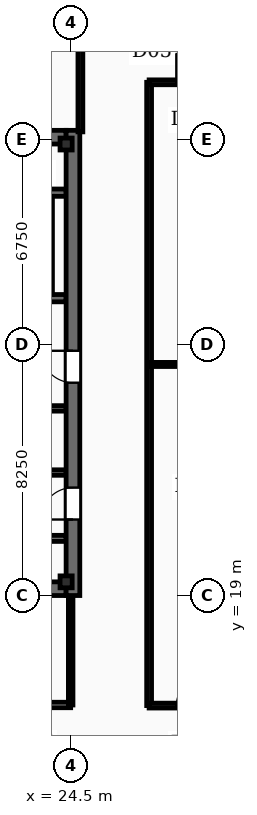
"""IFC4 building model, lengths in metres.
Left out: names, types, materials, properties, quantities, classifications, styles, units other than length and angle.
Written with IfcOpenShell. Run it as: python <this file> out.ifc"""

import sys

from ifc_helpers import new_model, si_unit, direction, frame, frame_2d, origin, origin_2d, place, context, subcontext, project, spatial, rectangle, i_section, extrude, element, fill, save


model = new_model("IFC4")
c1 = context("Model", 3, precision=1e-05, world=origin(), true_north=direction((0.0, 1.0)))
c2 = subcontext(c1, "Body", "Model", "MODEL_VIEW")
j1 = project(units=[si_unit("LENGTHUNIT", "METRE"), si_unit("PLANEANGLEUNIT", "RADIAN")], contexts=[c1])
p1 = place(None, origin())
s1 = spatial("IfcSite", under=j1, at=p1, CompositionType="ELEMENT")
p2 = place(p1, origin())
s2 = spatial("IfcBuilding", under=s1, at=p2, CompositionType="ELEMENT")
p3 = place(p2, frame((0.0, 0.0, 232.2)))
s3 = spatial("IfcBuildingStorey", under=s2, at=p3, CompositionType="ELEMENT", Elevation=232.2)
p4 = place(p3, frame((24.575, 19.0, -0.27), z_axis=(0.0, 0.0, 1.0), x_axis=(0.0, 1.0, 0.0)))
e1 = element("IfcWall", 1, at=p4, inside=s3, PredefinedType="SHEAR", context=c2, shape_type="SweptSolid", body=[
    extrude(rectangle(XDim=15.3, YDim=0.45, at=frame_2d((7.65, 0.0))), origin(), (0.0, 0.0, 1.0), 3.75),
])
p5 = place(p4, frame((2.5, 0.0, 0.27)))
e2 = element("IfcOpeningElement", 2, at=p5, cuts=e1, PredefinedType="OPENING", context=c2, shape_type="SweptSolid", body=[
    extrude(rectangle(XDim=1.05, YDim=2.15, at=frame_2d((0.525, 1.075))), frame((0.0, 0.235, 0.0), z_axis=(0.0, -1.0, 0.0), x_axis=(1.0, 0.0, 0.0)), (0.0, 0.0, 1.0), 0.47),
])
p6 = place(p4, frame((7.0, 0.0, 0.27)))
e3 = element("IfcOpeningElement", 3, at=p6, cuts=e1, PredefinedType="OPENING", context=c2, shape_type="SweptSolid", body=[
    extrude(rectangle(XDim=1.05, YDim=2.15, at=frame_2d((0.525, 1.075))), frame((0.0, 0.235, 0.0), z_axis=(0.0, -1.0, 0.0), x_axis=(1.0, 0.0, 0.0)), (0.0, 0.0, 1.0), 0.47),
])
for number, where, z_axis, x_axis in (
    (4, (14.55, 19.225, -0.27), (0.0, 0.0, 1.0), (1.0, 0.0, 0.0)),
    (5, (14.55, 34.075, -0.27), (0.0, 0.0, 1.0), (1.0, 0.0, 0.0)),
):
    element("IfcWall", number, at=place(p3, frame(where, z_axis=z_axis, x_axis=x_axis)), inside=s3, PredefinedType="SHEAR", context=c2, shape_type="SweptSolid", body=[
        extrude(rectangle(XDim=9.8, YDim=0.45, at=frame_2d((4.9, 0.0))), origin(), (0.0, 0.0, 1.0), 3.75),
    ])
for number, where, z_axis, x_axis in (
    (6, (24.35, 19.45, -0.27), (0.0, 0.0, 1.0), (1.0, 0.0, 0.0)),
    (7, (24.35, 33.85, -0.27), (0.0, 0.0, 1.0), (1.0, 0.0, 0.0)),
):
    element("IfcColumn", number, at=place(p3, frame(where, z_axis=z_axis, x_axis=x_axis)), inside=s3, PredefinedType="COLUMN", context=c2, shape_type="SweptSolid", body=[
        extrude(i_section(OverallWidth=0.399, OverallDepth=0.393, WebThickness=0.023, FlangeThickness=0.037, FilletRadius=0.02, at=origin_2d()), origin(), (0.0, 0.0, 1.0), 3.75),
    ])
p7 = place(p3, frame((24.35, 28.78, 0.0), z_axis=(0.0, 0.0, 1.0), x_axis=(-1.0, 0.0, 0.0)))
e8 = element("IfcWall", 8, at=p7, inside=s3, PredefinedType="SOLIDWALL", context=c2, shape_type="SweptSolid", body=[
    extrude(rectangle(XDim=9.8, YDim=0.24, at=frame_2d((4.9, 0.0))), origin(), (0.0, 0.0, 1.0), 3.48),
])
p8 = place(p7, frame((7.83, 0.0, 0.0)))
e9 = element("IfcOpeningElement", 9, at=p8, cuts=e8, PredefinedType="OPENING", context=c2, shape_type="SweptSolid", body=[
    extrude(rectangle(XDim=1.1, YDim=2.15, at=frame_2d((0.55, 1.075))), frame((0.0, 0.13, 0.0), z_axis=(0.0, -1.0, 0.0), x_axis=(1.0, 0.0, 0.0)), (0.0, 0.0, 1.0), 0.26),
])
p9 = place(p3, frame((14.55, 32.25, 0.0), z_axis=(0.0, 0.0, 1.0), x_axis=(1.0, 0.0, 0.0)))
e10 = element("IfcWall", 10, at=p9, inside=s3, PredefinedType="SOLIDWALL", context=c2, shape_type="SweptSolid", body=[
    extrude(rectangle(XDim=9.8, YDim=0.24, at=frame_2d((4.9, 0.0))), origin(), (0.0, 0.0, 1.0), 3.48),
])
p10 = place(p3, frame((23.78, 28.9, 0.0), z_axis=(0.0, 0.0, 1.0), x_axis=(0.0, 1.0, 0.0)))
e11 = element("IfcWall", 11, at=p10, inside=s3, PredefinedType="SOLIDWALL", context=c2, shape_type="SweptSolid", body=[
    extrude(rectangle(XDim=3.23, YDim=0.24, at=frame_2d((1.615, 0.0))), origin(), (0.0, 0.0, 1.0), 3.48),
])
for number, where, z_axis, x_axis in (
    (12, (20.95, 25.155, 0.0), (0.0, 0.0, 1.0), (1.0, 0.0, 0.0)),
    (13, (20.95, 23.045, 0.0), (0.0, 0.0, 1.0), (1.0, 0.0, 0.0)),
):
    element("IfcWall", number, at=place(p3, frame(where, z_axis=z_axis, x_axis=x_axis)), inside=s3, PredefinedType="SOLIDWALL", context=c2, shape_type="SweptSolid", body=[
        extrude(rectangle(XDim=3.4, YDim=0.18, at=frame_2d((1.7, 0.0))), origin(), (0.0, 0.0, 1.0), 3.48),
    ])
p11 = place(p3, frame((14.55, 20.88, 0.0), z_axis=(0.0, 0.0, 1.0), x_axis=(1.0, 0.0, 0.0)))
e14 = element("IfcWall", 14, at=p11, inside=s3, PredefinedType="SOLIDWALL", context=c2, shape_type="SweptSolid", body=[
    extrude(rectangle(XDim=9.8, YDim=0.2, at=frame_2d((4.9, 0.0))), origin(), (0.0, 0.0, 1.0), 2.54),
])
p12 = place(p11, frame((3.4, 0.0, 0.0)))
e15 = element("IfcOpeningElement", 15, at=p12, cuts=e14, PredefinedType="OPENING", context=c2, shape_type="SweptSolid", body=[
    extrude(rectangle(XDim=1.05, YDim=2.15, at=frame_2d((0.525, 1.075))), frame((0.0, 0.11, 0.0), z_axis=(0.0, -1.0, 0.0), x_axis=(1.0, 0.0, 0.0)), (0.0, 0.0, 1.0), 0.22),
])
p13 = place(p3, frame((14.6, 15.4, 0.0), z_axis=(0.0, 0.0, 1.0), x_axis=(1.0, 0.0, 0.0)))
e16 = element("IfcWall", 16, at=p13, inside=s3, PredefinedType="PARTITIONING", context=c2, shape_type="SweptSolid", body=[
    extrude(rectangle(XDim=9.9, YDim=0.18, at=frame_2d((4.95, 0.0))), origin(), (0.0, 0.0, 1.0), 2.54),
])
p14 = place(p13, frame((0.79, 0.0, 0.0)))
e17 = element("IfcOpeningElement", 17, at=p14, cuts=e16, PredefinedType="OPENING", context=c2, shape_type="SweptSolid", body=[
    extrude(rectangle(XDim=0.92, YDim=2.1, at=frame_2d((0.46, 1.05))), frame((0.0, 0.1, 0.0), z_axis=(0.0, -1.0, 0.0), x_axis=(1.0, 0.0, 0.0)), (0.0, 0.0, 1.0), 0.2),
])
p15 = place(p13, frame((3.29, 0.0, 0.0)))
e18 = element("IfcOpeningElement", 18, at=p15, cuts=e16, PredefinedType="OPENING", context=c2, shape_type="SweptSolid", body=[
    extrude(rectangle(XDim=0.92, YDim=2.1, at=frame_2d((0.46, 1.05))), frame((0.0, 0.1, 0.0), z_axis=(0.0, -1.0, 0.0), x_axis=(1.0, 0.0, 0.0)), (0.0, 0.0, 1.0), 0.2),
])
p16 = place(p13, frame((5.79, 0.0, 0.0)))
e19 = element("IfcOpeningElement", 19, at=p16, cuts=e16, PredefinedType="OPENING", context=c2, shape_type="SweptSolid", body=[
    extrude(rectangle(XDim=0.92, YDim=2.1, at=frame_2d((0.46, 1.05))), frame((0.0, 0.1, 0.0), z_axis=(0.0, -1.0, 0.0), x_axis=(1.0, 0.0, 0.0)), (0.0, 0.0, 1.0), 0.2),
])
p17 = place(p13, frame((8.24, 0.0, 0.0)))
e20 = element("IfcOpeningElement", 20, at=p17, cuts=e16, PredefinedType="OPENING", context=c2, shape_type="SweptSolid", body=[
    extrude(rectangle(XDim=0.92, YDim=2.1, at=frame_2d((0.46, 1.05))), frame((0.0, 0.1, 0.0), z_axis=(0.0, -1.0, 0.0), x_axis=(1.0, 0.0, 0.0)), (0.0, 0.0, 1.0), 0.2),
])
p18 = place(p3, frame((24.5, 15.4, 0.0), z_axis=(0.0, 0.0, 1.0), x_axis=(0.0, 1.0, 0.0)))
e21 = element("IfcWall", 21, at=p18, inside=s3, PredefinedType="PARTITIONING", context=c2, shape_type="SweptSolid", body=[
    extrude(rectangle(XDim=3.58, YDim=0.15, at=frame_2d((1.79, 0.0))), origin(), (0.0, 0.0, 1.0), 2.54),
])
p19 = place(p3, frame((24.82, 34.25, 0.0), z_axis=(0.0, 0.0, 1.0), x_axis=(0.0, 1.0, 0.0)))
e22 = element("IfcWall", 22, at=p19, inside=s3, PredefinedType="PARTITIONING", context=c2, shape_type="SweptSolid", body=[
    extrude(rectangle(XDim=3.87, YDim=0.16, at=frame_2d((1.935, 0.0))), origin(), (0.0, 0.0, 1.0), 2.54),
])
p20 = place(p3, frame((27.08, 26.6, 0.0), z_axis=(0.0, 0.0, 1.0), x_axis=(1.0, 0.0, 0.0)))
e23 = element("IfcWall", 23, at=p20, inside=s3, PredefinedType="PARTITIONING", context=c2, shape_type="SweptSolid", body=[
    extrude(rectangle(XDim=20.74, YDim=0.135, at=frame_2d((10.37, 0.0))), origin(), (0.0, 0.0, 1.0), 2.54),
])
p21 = place(p3, frame((27.08, 35.88, 0.0), z_axis=(0.0, 0.0, 1.0), x_axis=(1.0, 0.0, 0.0)))
e24 = element("IfcWall", 24, at=p21, inside=s3, PredefinedType="PARTITIONING", context=c2, shape_type="SweptSolid", body=[
    extrude(rectangle(XDim=20.74, YDim=0.16, at=frame_2d((10.37, 0.0))), origin(), (0.0, 0.0, 1.0), 2.54),
])
p22 = place(p21, frame((0.895, 0.0, 0.0)))
e25 = element("IfcOpeningElement", 25, at=p22, cuts=e24, PredefinedType="OPENING", context=c2, shape_type="SweptSolid", body=[
    extrude(rectangle(XDim=0.95, YDim=2.15, at=frame_2d((0.475, 1.075))), frame((0.0, 0.09, 0.0), z_axis=(0.0, -1.0, 0.0), x_axis=(1.0, 0.0, 0.0)), (0.0, 0.0, 1.0), 0.18),
])
p23 = place(p21, frame((5.295, 0.0, 0.0)))
e26 = element("IfcOpeningElement", 26, at=p23, cuts=e24, PredefinedType="OPENING", context=c2, shape_type="SweptSolid", body=[
    extrude(rectangle(XDim=0.95, YDim=2.15, at=frame_2d((0.475, 1.075))), frame((0.0, 0.09, 0.0), z_axis=(0.0, -1.0, 0.0), x_axis=(1.0, 0.0, 0.0)), (0.0, 0.0, 1.0), 0.18),
])
p24 = place(p21, frame((9.295, 0.0, 0.0)))
e27 = element("IfcOpeningElement", 27, at=p24, cuts=e24, PredefinedType="OPENING", context=c2, shape_type="SweptSolid", body=[
    extrude(rectangle(XDim=0.95, YDim=2.15, at=frame_2d((0.475, 1.075))), frame((0.0, 0.09, 0.0), z_axis=(0.0, -1.0, 0.0), x_axis=(1.0, 0.0, 0.0)), (0.0, 0.0, 1.0), 0.18),
])
p25 = place(p21, frame((13.945, 0.0, 0.0)))
e28 = element("IfcOpeningElement", 28, at=p25, cuts=e24, PredefinedType="OPENING", context=c2, shape_type="SweptSolid", body=[
    extrude(rectangle(XDim=0.95, YDim=2.15, at=frame_2d((0.475, 1.075))), frame((0.0, 0.09, 0.0), z_axis=(0.0, -1.0, 0.0), x_axis=(1.0, 0.0, 0.0)), (0.0, 0.0, 1.0), 0.18),
])
p26 = place(p21, frame((17.445, 0.0, 0.0)))
e29 = element("IfcOpeningElement", 29, at=p26, cuts=e24, PredefinedType="OPENING", context=c2, shape_type="SweptSolid", body=[
    extrude(rectangle(XDim=0.95, YDim=2.15, at=frame_2d((0.475, 1.075))), frame((0.0, 0.09, 0.0), z_axis=(0.0, -1.0, 0.0), x_axis=(1.0, 0.0, 0.0)), (0.0, 0.0, 1.0), 0.18),
])
p27 = place(p21, frame((19.57, 0.0, 0.0)))
e30 = element("IfcOpeningElement", 30, at=p27, cuts=e24, PredefinedType="OPENING", context=c2, shape_type="SweptSolid", body=[
    extrude(rectangle(XDim=0.95, YDim=2.15, at=frame_2d((0.475, 1.075))), frame((0.0, 0.09, 0.0), z_axis=(0.0, -1.0, 0.0), x_axis=(1.0, 0.0, 0.0)), (0.0, 0.0, 1.0), 0.18),
])
p28 = place(p3, frame((27.08, 15.38, 0.0), z_axis=(0.0, 0.0, 1.0), x_axis=(1.0, 0.0, 0.0)))
e31 = element("IfcWall", 31, at=p28, inside=s3, PredefinedType="PARTITIONING", context=c2, shape_type="SweptSolid", body=[
    extrude(rectangle(XDim=20.74, YDim=0.16, at=frame_2d((10.37, 0.0))), origin(), (0.0, 0.0, 1.0), 2.54),
])
p29 = place(p28, frame((0.895, 0.0, 0.0)))
e32 = element("IfcOpeningElement", 32, at=p29, cuts=e31, PredefinedType="OPENING", context=c2, shape_type="SweptSolid", body=[
    extrude(rectangle(XDim=0.95, YDim=2.15, at=frame_2d((0.475, 1.075))), frame((0.0, 0.09, 0.0), z_axis=(0.0, -1.0, 0.0), x_axis=(1.0, 0.0, 0.0)), (0.0, 0.0, 1.0), 0.18),
])
p30 = place(p28, frame((5.295, 0.0, 0.0)))
e33 = element("IfcOpeningElement", 33, at=p30, cuts=e31, PredefinedType="OPENING", context=c2, shape_type="SweptSolid", body=[
    extrude(rectangle(XDim=0.95, YDim=2.15, at=frame_2d((0.475, 1.075))), frame((0.0, 0.09, 0.0), z_axis=(0.0, -1.0, 0.0), x_axis=(1.0, 0.0, 0.0)), (0.0, 0.0, 1.0), 0.18),
])
p31 = place(p28, frame((9.295, 0.0, 0.0)))
e34 = element("IfcOpeningElement", 34, at=p31, cuts=e31, PredefinedType="OPENING", context=c2, shape_type="SweptSolid", body=[
    extrude(rectangle(XDim=0.95, YDim=2.15, at=frame_2d((0.475, 1.075))), frame((0.0, 0.09, 0.0), z_axis=(0.0, -1.0, 0.0), x_axis=(1.0, 0.0, 0.0)), (0.0, 0.0, 1.0), 0.18),
])
p32 = place(p28, frame((13.945, 0.0, 0.0)))
e35 = element("IfcOpeningElement", 35, at=p32, cuts=e31, PredefinedType="OPENING", context=c2, shape_type="SweptSolid", body=[
    extrude(rectangle(XDim=0.95, YDim=2.15, at=frame_2d((0.475, 1.075))), frame((0.0, 0.09, 0.0), z_axis=(0.0, -1.0, 0.0), x_axis=(1.0, 0.0, 0.0)), (0.0, 0.0, 1.0), 0.18),
])
p33 = place(p28, frame((17.445, 0.0, 0.0)))
e36 = element("IfcOpeningElement", 36, at=p33, cuts=e31, PredefinedType="OPENING", context=c2, shape_type="SweptSolid", body=[
    extrude(rectangle(XDim=0.95, YDim=2.15, at=frame_2d((0.475, 1.075))), frame((0.0, 0.09, 0.0), z_axis=(0.0, -1.0, 0.0), x_axis=(1.0, 0.0, 0.0)), (0.0, 0.0, 1.0), 0.18),
])
p34 = place(p28, frame((19.57, 0.0, 0.0)))
e37 = element("IfcOpeningElement", 37, at=p34, cuts=e31, PredefinedType="OPENING", context=c2, shape_type="SweptSolid", body=[
    extrude(rectangle(XDim=0.95, YDim=2.15, at=frame_2d((0.475, 1.075))), frame((0.0, 0.09, 0.0), z_axis=(0.0, -1.0, 0.0), x_axis=(1.0, 0.0, 0.0)), (0.0, 0.0, 1.0), 0.18),
])
p35 = place(p3, frame((27.08, 15.38, 0.0), z_axis=(0.0, 0.0, 1.0), x_axis=(0.0, 1.0, 0.0)))
e38 = element("IfcWall", 38, at=p35, inside=s3, PredefinedType="PARTITIONING", context=c2, shape_type="SweptSolid", body=[
    extrude(rectangle(XDim=20.5, YDim=0.16, at=frame_2d((10.25, 0.0))), origin(), (0.0, 0.0, 1.0), 2.54),
])
p36 = place(p5, origin())
e39 = element("IfcDoor", 39, at=p36, inside=s3, OperationType="SINGLE_SWING_LEFT", PredefinedType="DOOR", context=c2, shape_type="SweptSolid", body=[
    extrude(rectangle(XDim=1.05, YDim=2.15, at=frame_2d((0.525, 1.075))), frame((0.0, 0.025, 0.0), z_axis=(0.0, -1.0, 0.0), x_axis=(1.0, 0.0, 0.0)), (0.0, 0.0, 1.0), 0.05),
])
fill(e2, e39)
p37 = place(p6, origin())
e40 = element("IfcDoor", 40, at=p37, inside=s3, OperationType="SINGLE_SWING_RIGHT", PredefinedType="DOOR", context=c2, shape_type="SweptSolid", body=[
    extrude(rectangle(XDim=1.05, YDim=2.15, at=frame_2d((0.525, 1.075))), frame((0.0, 0.025, 0.0), z_axis=(0.0, -1.0, 0.0), x_axis=(1.0, 0.0, 0.0)), (0.0, 0.0, 1.0), 0.05),
])
fill(e3, e40)
p38 = place(p22, origin())
e41 = element("IfcDoor", 41, at=p38, inside=s3, OperationType="SINGLE_SWING_LEFT", PredefinedType="DOOR", context=c2, shape_type="SweptSolid", body=[
    extrude(rectangle(XDim=0.95, YDim=2.15, at=frame_2d((0.475, 1.075))), frame((0.0, 0.025, 0.0), z_axis=(0.0, -1.0, 0.0), x_axis=(1.0, 0.0, 0.0)), (0.0, 0.0, 1.0), 0.05),
])
fill(e25, e41)
p39 = place(p29, origin())
e42 = element("IfcDoor", 42, at=p39, inside=s3, OperationType="SINGLE_SWING_RIGHT", PredefinedType="DOOR", context=c2, shape_type="SweptSolid", body=[
    extrude(rectangle(XDim=0.95, YDim=2.15, at=frame_2d((0.475, 1.075))), frame((0.0, 0.025, 0.0), z_axis=(0.0, -1.0, 0.0), x_axis=(1.0, 0.0, 0.0)), (0.0, 0.0, 1.0), 0.05),
])
fill(e32, e42)
save(model, sys.argv[1])
